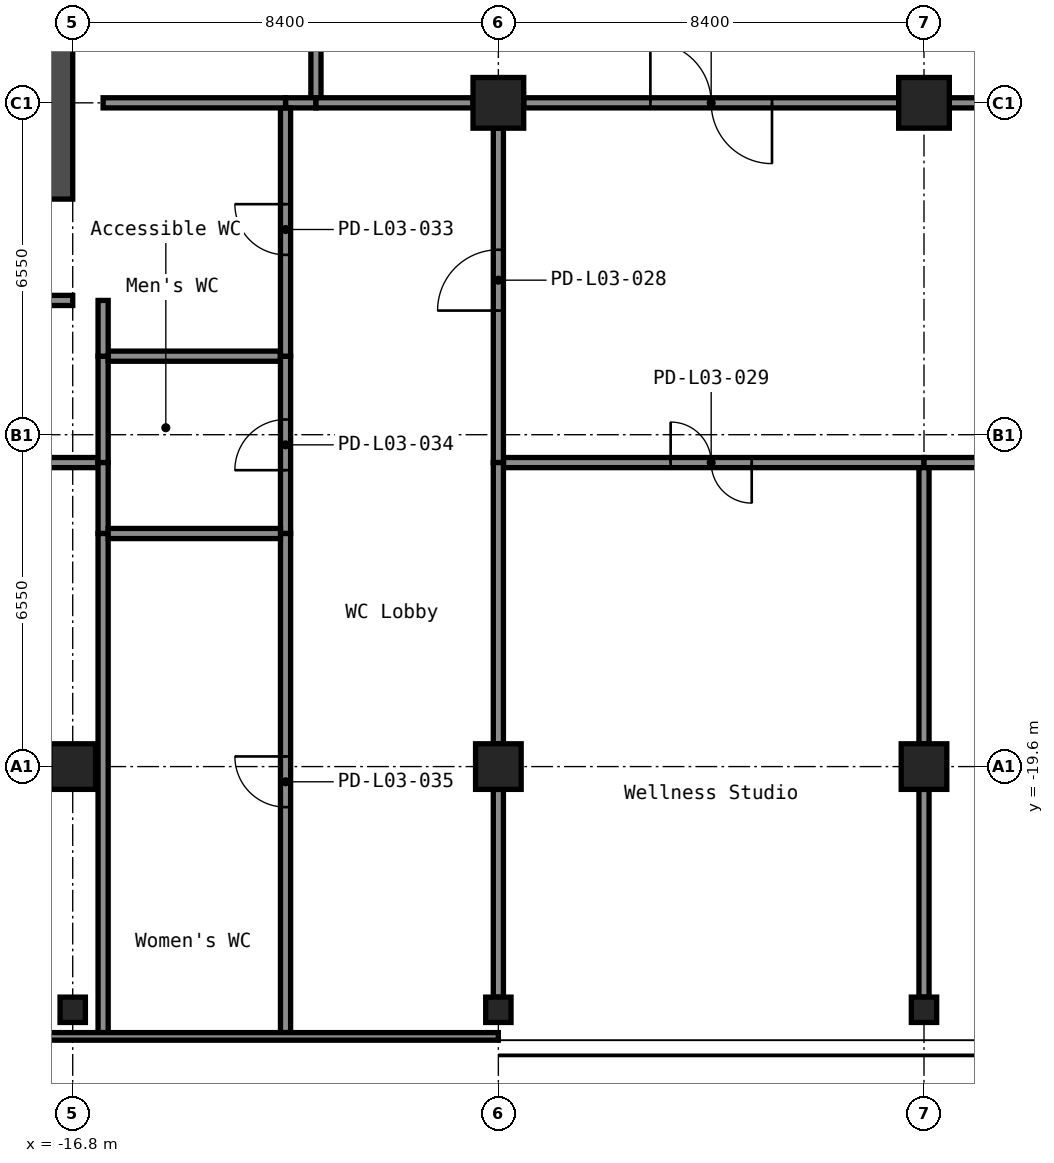
"""IFC4 building model, lengths in metres.
Left out: names, types, materials, properties, quantities, classifications, styles, units other than length and angle.
Written with IfcOpenShell. Run it as: python <this file> out.ifc"""

import sys

from ifc_helpers import new_model, si_unit, direction, frame, frame_2d, origin, origin_2d, place, context, subcontext, project, spatial, rectangle, hollow_rectangle, extrude, element, fill, save


model = new_model("IFC4")
c1 = context("Model", 3, precision=1e-05, world=origin(), true_north=direction((0.0, 1.0)))
c2 = subcontext(c1, "Body", "Model", "MODEL_VIEW")
j1 = project(units=[si_unit("LENGTHUNIT", "METRE"), si_unit("PLANEANGLEUNIT", "RADIAN")], contexts=[c1])
p1 = place(None, origin())
s1 = spatial("IfcSite", under=j1, at=p1, CompositionType="ELEMENT")
p2 = place(p1, origin())
s2 = spatial("IfcBuilding", under=s1, at=p2, CompositionType="ELEMENT")
p3 = place(p2, frame((0.0, 0.0, 15.0)))
s3 = spatial("IfcBuildingStorey", under=s2, at=p3, CompositionType="ELEMENT", Elevation=15.0)
for number, where, z_axis, x_axis in (
    (1, (-16.8, -19.6, 0.0), (0.0, 0.0, 1.0), (1.0, 0.0, 0.0)),
    (2, (-8.4, -19.6, 0.0), (0.0, 0.0, 1.0), (1.0, 0.0, 0.0)),
):
    element("IfcColumn", number, at=place(p3, frame(where, z_axis=z_axis, x_axis=x_axis)), inside=s3, PredefinedType="COLUMN", context=c2, shape_type="SweptSolid", body=[
        extrude(hollow_rectangle(XDim=0.9, YDim=0.9, WallThickness=0.036, at=origin_2d()), origin(), (0.0, 0.0, 1.0), 4.4),
    ])
p4 = place(p3, frame((-8.4, -6.5, 0.0), z_axis=(0.0, 0.0, 1.0), x_axis=(1.0, 0.0, 0.0)))
e3 = element("IfcColumn", 3, at=p4, inside=s3, PredefinedType="COLUMN", context=c2, shape_type="SweptSolid", body=[
    extrude(hollow_rectangle(XDim=1.0, YDim=1.0, WallThickness=0.04, at=origin_2d()), origin(), (0.0, 0.0, 1.0), 4.4),
])
p5 = place(p3, frame((0.0, -19.6, 0.0), z_axis=(0.0, 0.0, 1.0), x_axis=(1.0, 0.0, 0.0)))
e4 = element("IfcColumn", 4, at=p5, inside=s3, PredefinedType="COLUMN", context=c2, shape_type="SweptSolid", body=[
    extrude(hollow_rectangle(XDim=0.9, YDim=0.9, WallThickness=0.036, at=origin_2d()), origin(), (0.0, 0.0, 1.0), 4.4),
])
p6 = place(p3, frame((0.0, -6.5, 0.0), z_axis=(0.0, 0.0, 1.0), x_axis=(1.0, 0.0, 0.0)))
e5 = element("IfcColumn", 5, at=p6, inside=s3, PredefinedType="COLUMN", context=c2, shape_type="SweptSolid", body=[
    extrude(hollow_rectangle(XDim=1.0, YDim=1.0, WallThickness=0.04, at=origin_2d()), origin(), (0.0, 0.0, 1.0), 4.4),
])
for number, where, z_axis, x_axis in (
    (6, (-16.8, -24.4, 0.0), (0.0, 0.0, 1.0), (1.0, 0.0, 0.0)),
    (7, (-8.4, -24.4, 0.0), (0.0, 0.0, 1.0), (1.0, 0.0, 0.0)),
    (8, (0.0, -24.4, 0.0), (0.0, 0.0, 1.0), (1.0, 0.0, 0.0)),
):
    element("IfcColumn", number, at=place(p3, frame(where, z_axis=z_axis, x_axis=x_axis)), inside=s3, PredefinedType="COLUMN", context=c2, shape_type="SweptSolid", body=[
        extrude(hollow_rectangle(XDim=0.5, YDim=0.5, WallThickness=0.019, InnerFilletRadius=0.029, OuterFilletRadius=0.048, at=origin_2d()), origin(), (0.0, 0.0, 1.0), 4.4),
    ])
p7 = place(p3, frame((-17.25, -8.4, 0.0), z_axis=(0.0, 0.0, 1.0), x_axis=(0.0, 1.0, 0.0)))
e9 = element("IfcWall", 9, at=p7, inside=s3, PredefinedType="SHEAR", context=c2, shape_type="SweptSolid", body=[
    extrude(rectangle(XDim=16.8, YDim=0.9, at=frame_2d((8.4, 0.0))), origin(), (0.0, 0.0, 1.0), 4.4),
])
p8 = place(p7, frame((3.4, 0.0, 0.0)))
e10 = element("IfcOpeningElement", 10, at=p8, cuts=e9, PredefinedType="OPENING", context=c2, shape_type="SweptSolid", body=[
    extrude(rectangle(XDim=1.6, YDim=2.1, at=frame_2d((0.8, 1.05))), frame((0.0, 0.46, 0.0), z_axis=(0.0, -1.0, 0.0), x_axis=(1.0, 0.0, 0.0)), (0.0, 0.0, 1.0), 0.92),
])
p9 = place(p7, frame((9.6, 0.0, 0.0)))
e11 = element("IfcOpeningElement", 11, at=p9, cuts=e9, PredefinedType="OPENING", context=c2, shape_type="SweptSolid", body=[
    extrude(rectangle(XDim=1.6, YDim=2.1, at=frame_2d((0.8, 1.05))), frame((0.0, 0.46, 0.0), z_axis=(0.0, -1.0, 0.0), x_axis=(1.0, 0.0, 0.0)), (0.0, 0.0, 1.0), 0.92),
])
p10 = place(p7, frame((11.8, 0.0, 0.0)))
e12 = element("IfcOpeningElement", 12, at=p10, cuts=e9, PredefinedType="OPENING", context=c2, shape_type="SweptSolid", body=[
    extrude(rectangle(XDim=1.6, YDim=2.1, at=frame_2d((0.8, 1.05))), frame((0.0, 0.46, 0.0), z_axis=(0.0, -1.0, 0.0), x_axis=(1.0, 0.0, 0.0)), (0.0, 0.0, 1.0), 0.92),
])
p11 = place(p3, frame((-12.0, 6.4, 0.0), z_axis=(0.0, 0.0, 1.0), x_axis=(0.0, -1.0, 0.0)))
e13 = element("IfcWall", 13, at=p11, inside=s3, PredefinedType="PARTITIONING", context=c2, shape_type="SweptSolid", body=[
    extrude(rectangle(XDim=12.8, YDim=0.2, at=frame_2d((6.4, 0.0))), origin(), (0.0, 0.0, 1.0), 4.4),
])
p12 = place(p11, frame((5.2, 0.0, 0.0)))
e14 = element("IfcOpeningElement", 14, at=p12, cuts=e13, PredefinedType="OPENING", context=c2, shape_type="SweptSolid", body=[
    extrude(rectangle(XDim=2.4, YDim=2.1, at=frame_2d((1.2, 1.05))), frame((0.0, 0.11, 0.0), z_axis=(0.0, -1.0, 0.0), x_axis=(1.0, 0.0, 0.0)), (0.0, 0.0, 1.0), 0.22),
])
p13 = place(p3, frame((7.9, -6.5, 0.0), z_axis=(0.0, 0.0, 1.0), x_axis=(-1.0, 0.0, 0.0)))
e15 = element("IfcWall", 15, at=p13, inside=s3, PredefinedType="PARTITIONING", context=c2, shape_type="SweptSolid", body=[
    extrude(rectangle(XDim=7.4, YDim=0.2, at=frame_2d((3.7, 0.0))), origin(), (0.0, 0.0, 1.0), 4.4),
])
p14 = place(p13, frame((2.5, 0.0, 0.0)))
e16 = element("IfcOpeningElement", 16, at=p14, cuts=e15, PredefinedType="OPENING", context=c2, shape_type="SweptSolid", body=[
    extrude(rectangle(XDim=2.4, YDim=2.1, at=frame_2d((1.2, 1.05))), frame((0.0, 0.11, 0.0), z_axis=(0.0, -1.0, 0.0), x_axis=(1.0, 0.0, 0.0)), (0.0, 0.0, 1.0), 0.22),
])
p15 = place(p3, frame((-0.5, -6.5, 0.0), z_axis=(0.0, 0.0, 1.0), x_axis=(-1.0, 0.0, 0.0)))
e17 = element("IfcWall", 17, at=p15, inside=s3, PredefinedType="PARTITIONING", context=c2, shape_type="SweptSolid", body=[
    extrude(rectangle(XDim=7.4, YDim=0.2, at=frame_2d((3.7, 0.0))), origin(), (0.0, 0.0, 1.0), 4.4),
])
p16 = place(p15, frame((2.5, 0.0, 0.0)))
e18 = element("IfcOpeningElement", 18, at=p16, cuts=e17, PredefinedType="OPENING", context=c2, shape_type="SweptSolid", body=[
    extrude(rectangle(XDim=2.4, YDim=2.1, at=frame_2d((1.2, 1.05))), frame((0.0, 0.11, 0.0), z_axis=(0.0, -1.0, 0.0), x_axis=(1.0, 0.0, 0.0)), (0.0, 0.0, 1.0), 0.22),
])
p17 = place(p3, frame((-16.3, -13.6, 0.0), z_axis=(0.0, 0.0, 1.0), x_axis=(-1.0, 0.0, 0.0)))
e19 = element("IfcWall", 19, at=p17, inside=s3, PredefinedType="PARTITIONING", context=c2, shape_type="SweptSolid", body=[
    extrude(rectangle(XDim=8.9, YDim=0.2, at=frame_2d((4.45, 0.0))), origin(), (0.0, 0.0, 1.0), 4.4),
])
p18 = place(p17, frame((3.95, 0.0, 0.0)))
e20 = element("IfcOpeningElement", 20, at=p18, cuts=e19, PredefinedType="OPENING", context=c2, shape_type="SweptSolid", body=[
    extrude(rectangle(XDim=1.0, YDim=2.1, at=frame_2d((0.5, 1.05))), frame((0.0, 0.11, 0.0), z_axis=(0.0, -1.0, 0.0), x_axis=(1.0, 0.0, 0.0)), (0.0, 0.0, 1.0), 0.22),
])
p19 = place(p3, frame((0.0, -13.6, 0.0), z_axis=(0.0, 0.0, 1.0), x_axis=(-1.0, 0.0, 0.0)))
e21 = element("IfcWall", 21, at=p19, inside=s3, PredefinedType="PARTITIONING", context=c2, shape_type="SweptSolid", body=[
    extrude(rectangle(XDim=8.3, YDim=0.2, at=frame_2d((4.15, 0.0))), origin(), (0.0, 0.0, 1.0), 4.4),
])
p20 = place(p19, frame((3.4, 0.0, 0.0)))
e22 = element("IfcOpeningElement", 22, at=p20, cuts=e21, PredefinedType="OPENING", context=c2, shape_type="SweptSolid", body=[
    extrude(rectangle(XDim=1.6, YDim=2.1, at=frame_2d((0.8, 1.05))), frame((0.0, 0.11, 0.0), z_axis=(0.0, -1.0, 0.0), x_axis=(1.0, 0.0, 0.0)), (0.0, 0.0, 1.0), 0.22),
])
p21 = place(p3, frame((8.4, -13.6, 0.0), z_axis=(0.0, 0.0, 1.0), x_axis=(-1.0, 0.0, 0.0)))
e23 = element("IfcWall", 23, at=p21, inside=s3, PredefinedType="PARTITIONING", context=c2, shape_type="SweptSolid", body=[
    extrude(rectangle(XDim=8.4, YDim=0.2, at=frame_2d((4.2, 0.0))), origin(), (0.0, 0.0, 1.0), 4.4),
])
p22 = place(p21, frame((3.4, 0.0, 0.0)))
e24 = element("IfcOpeningElement", 24, at=p22, cuts=e23, PredefinedType="OPENING", context=c2, shape_type="SweptSolid", body=[
    extrude(rectangle(XDim=1.6, YDim=2.1, at=frame_2d((0.8, 1.05))), frame((0.0, 0.11, 0.0), z_axis=(0.0, -1.0, 0.0), x_axis=(1.0, 0.0, 0.0)), (0.0, 0.0, 1.0), 0.22),
])
p23 = place(p3, frame((-16.2, -13.6, 0.0), z_axis=(0.0, 0.0, 1.0), x_axis=(0.0, 1.0, 0.0)))
e25 = element("IfcWall", 25, at=p23, inside=s3, PredefinedType="PARTITIONING", context=c2, shape_type="SweptSolid", body=[
    extrude(rectangle(XDim=2.1, YDim=0.2, at=frame_2d((1.05, 0.0))), origin(), (0.0, 0.0, 1.0), 4.4),
])
p24 = place(p3, frame((-16.2, -15.0, 0.0), z_axis=(0.0, 0.0, 1.0), x_axis=(0.0, 1.0, 0.0)))
e26 = element("IfcWall", 26, at=p24, inside=s3, PredefinedType="PARTITIONING", context=c2, shape_type="SweptSolid", body=[
    extrude(rectangle(XDim=1.4, YDim=0.2, at=frame_2d((0.7, 0.0))), origin(), (0.0, 0.0, 1.0), 4.4),
])
p25 = place(p3, frame((-16.1, -11.5, 0.0), z_axis=(0.0, 0.0, 1.0), x_axis=(1.0, 0.0, 0.0)))
e27 = element("IfcWall", 27, at=p25, inside=s3, PredefinedType="PARTITIONING", context=c2, shape_type="SweptSolid", body=[
    extrude(rectangle(XDim=3.4, YDim=0.2, at=frame_2d((1.7, 0.0))), origin(), (0.0, 0.0, 1.0), 4.4),
])
p26 = place(p3, frame((-12.6, -6.5, 0.0), z_axis=(0.0, 0.0, 1.0), x_axis=(1.0, 0.0, 0.0)))
e28 = element("IfcWall", 28, at=p26, inside=s3, PredefinedType="PARTITIONING", context=c2, shape_type="SweptSolid", body=[
    extrude(rectangle(XDim=0.6, YDim=0.2, at=frame_2d((0.3, 0.0))), origin(), (0.0, 0.0, 1.0), 4.4),
])
p27 = place(p3, frame((-12.0, -6.5, 0.0), z_axis=(0.0, 0.0, 1.0), x_axis=(1.0, 0.0, 0.0)))
e29 = element("IfcWall", 29, at=p27, inside=s3, PredefinedType="PARTITIONING", context=c2, shape_type="SweptSolid", body=[
    extrude(rectangle(XDim=3.1, YDim=0.2, at=frame_2d((1.55, 0.0))), origin(), (0.0, 0.0, 1.0), 4.4),
])
p28 = place(p3, frame((-8.4, -7.0, 0.0), z_axis=(0.0, 0.0, 1.0), x_axis=(0.0, -1.0, 0.0)))
e30 = element("IfcWall", 30, at=p28, inside=s3, PredefinedType="PARTITIONING", context=c2, shape_type="SweptSolid", body=[
    extrude(rectangle(XDim=6.6, YDim=0.2, at=frame_2d((3.3, 0.0))), origin(), (0.0, 0.0, 1.0), 4.4),
])
p29 = place(p28, frame((2.4, 0.0, 0.0)))
e31 = element("IfcOpeningElement", 31, at=p29, cuts=e30, PredefinedType="OPENING", context=c2, shape_type="SweptSolid", body=[
    extrude(rectangle(XDim=1.2, YDim=2.1, at=frame_2d((0.6, 1.05))), frame((0.0, 0.11, 0.0), z_axis=(0.0, -1.0, 0.0), x_axis=(1.0, 0.0, 0.0)), (0.0, 0.0, 1.0), 0.22),
])
p30 = place(p3, frame((-12.6, -15.0, 0.0), z_axis=(0.0, 0.0, 1.0), x_axis=(0.0, 1.0, 0.0)))
e32 = element("IfcWall", 32, at=p30, inside=s3, PredefinedType="PARTITIONING", context=c2, shape_type="SweptSolid", body=[
    extrude(rectangle(XDim=3.5, YDim=0.2, at=frame_2d((1.75, 0.0))), origin(), (0.0, 0.0, 1.0), 4.4),
])
p31 = place(p30, frame((1.25, 0.0, 0.0)))
e33 = element("IfcOpeningElement", 33, at=p31, cuts=e32, PredefinedType="OPENING", context=c2, shape_type="SweptSolid", body=[
    extrude(rectangle(XDim=1.0, YDim=2.1, at=frame_2d((0.5, 1.05))), frame((0.0, 0.11, 0.0), z_axis=(0.0, -1.0, 0.0), x_axis=(1.0, 0.0, 0.0)), (0.0, 0.0, 1.0), 0.22),
])
p32 = place(p3, frame((-12.6, -11.5, 0.0), z_axis=(0.0, 0.0, 1.0), x_axis=(0.0, 1.0, 0.0)))
e34 = element("IfcWall", 34, at=p32, inside=s3, PredefinedType="PARTITIONING", context=c2, shape_type="SweptSolid", body=[
    extrude(rectangle(XDim=4.9, YDim=0.2, at=frame_2d((2.45, 0.0))), origin(), (0.0, 0.0, 1.0), 4.4),
])
p33 = place(p32, frame((2.0, 0.0, 0.0)))
e35 = element("IfcOpeningElement", 35, at=p33, cuts=e34, PredefinedType="OPENING", context=c2, shape_type="SweptSolid", body=[
    extrude(rectangle(XDim=1.0, YDim=2.1, at=frame_2d((0.5, 1.05))), frame((0.0, 0.11, 0.0), z_axis=(0.0, -1.0, 0.0), x_axis=(1.0, 0.0, 0.0)), (0.0, 0.0, 1.0), 0.22),
])
p34 = place(p3, frame((-12.6, -24.85, 0.0), z_axis=(0.0, 0.0, 1.0), x_axis=(0.0, 1.0, 0.0)))
e36 = element("IfcWall", 36, at=p34, inside=s3, PredefinedType="PARTITIONING", context=c2, shape_type="SweptSolid", body=[
    extrude(rectangle(XDim=9.85, YDim=0.2, at=frame_2d((4.925, 0.0))), origin(), (0.0, 0.0, 1.0), 4.4),
])
p35 = place(p34, frame((4.45, 0.0, 0.0)))
e37 = element("IfcOpeningElement", 37, at=p35, cuts=e36, PredefinedType="OPENING", context=c2, shape_type="SweptSolid", body=[
    extrude(rectangle(XDim=1.0, YDim=2.1, at=frame_2d((0.5, 1.05))), frame((0.0, 0.11, 0.0), z_axis=(0.0, -1.0, 0.0), x_axis=(1.0, 0.0, 0.0)), (0.0, 0.0, 1.0), 0.22),
])
p36 = place(p3, frame((-8.4, -13.6, 0.0), z_axis=(0.0, 0.0, 1.0), x_axis=(0.0, -1.0, 0.0)))
e38 = element("IfcWall", 38, at=p36, inside=s3, PredefinedType="PARTITIONING", context=c2, shape_type="SweptSolid", body=[
    extrude(rectangle(XDim=5.55, YDim=0.2, at=frame_2d((2.775, 0.0))), origin(), (0.0, 0.0, 1.0), 4.4),
])
p37 = place(p3, frame((-8.4, -20.05, 0.0), z_axis=(0.0, 0.0, 1.0), x_axis=(0.0, -1.0, 0.0)))
e39 = element("IfcWall", 39, at=p37, inside=s3, PredefinedType="PARTITIONING", context=c2, shape_type="SweptSolid", body=[
    extrude(rectangle(XDim=4.1, YDim=0.2, at=frame_2d((2.05, 0.0))), origin(), (0.0, 0.0, 1.0), 4.4),
])
p38 = place(p3, frame((-16.2, -6.5, 0.0), z_axis=(0.0, 0.0, 1.0), x_axis=(1.0, 0.0, 0.0)))
e40 = element("IfcWall", 40, at=p38, inside=s3, PredefinedType="PARTITIONING", context=c2, shape_type="SweptSolid", body=[
    extrude(rectangle(XDim=3.6, YDim=0.2, at=frame_2d((1.8, 0.0))), origin(), (0.0, 0.0, 1.0), 4.4),
])
p39 = place(p3, frame((-16.2, -11.5, 0.0), z_axis=(0.0, 0.0, 1.0), x_axis=(0.0, 1.0, 0.0)))
e41 = element("IfcWall", 41, at=p39, inside=s3, PredefinedType="PARTITIONING", context=c2, shape_type="SweptSolid", body=[
    extrude(rectangle(XDim=1.1, YDim=0.2, at=frame_2d((0.55, 0.0))), origin(), (0.0, 0.0, 1.0), 4.4),
])
p40 = place(p3, frame((-16.2, -24.85, 0.0), z_axis=(0.0, 0.0, 1.0), x_axis=(0.0, 1.0, 0.0)))
e42 = element("IfcWall", 42, at=p40, inside=s3, PredefinedType="PARTITIONING", context=c2, shape_type="SweptSolid", body=[
    extrude(rectangle(XDim=9.85, YDim=0.2, at=frame_2d((4.925, 0.0))), origin(), (0.0, 0.0, 1.0), 4.4),
])
p41 = place(p3, frame((-16.1, -15.0, 0.0), z_axis=(0.0, 0.0, 1.0), x_axis=(1.0, 0.0, 0.0)))
e43 = element("IfcWall", 43, at=p41, inside=s3, PredefinedType="PARTITIONING", context=c2, shape_type="SweptSolid", body=[
    extrude(rectangle(XDim=3.4, YDim=0.2, at=frame_2d((1.7, 0.0))), origin(), (0.0, 0.0, 1.0), 4.4),
])
p42 = place(p3, frame((0.0, -13.7, 0.0), z_axis=(0.0, 0.0, 1.0), x_axis=(0.0, -1.0, 0.0)))
e44 = element("IfcWall", 44, at=p42, inside=s3, PredefinedType="PARTITIONING", context=c2, shape_type="SweptSolid", body=[
    extrude(rectangle(XDim=5.45, YDim=0.2, at=frame_2d((2.725, 0.0))), origin(), (0.0, 0.0, 1.0), 4.4),
])
p43 = place(p3, frame((0.0, -20.05, 0.0), z_axis=(0.0, 0.0, 1.0), x_axis=(0.0, -1.0, 0.0)))
e45 = element("IfcWall", 45, at=p43, inside=s3, PredefinedType="PARTITIONING", context=c2, shape_type="SweptSolid", body=[
    extrude(rectangle(XDim=4.1, YDim=0.2, at=frame_2d((2.05, 0.0))), origin(), (0.0, 0.0, 1.0), 4.4),
])
p44 = place(p3, frame((-16.8, -10.4, 0.0), z_axis=(0.0, 0.0, 1.0), x_axis=(-1.0, 0.0, 0.0)))
e46 = element("IfcWall", 46, at=p44, inside=s3, PredefinedType="PARTITIONING", context=c2, shape_type="SweptSolid", body=[
    extrude(rectangle(XDim=22.2, YDim=0.2, at=frame_2d((11.1, 0.0))), origin(), (0.0, 0.0, 1.0), 4.4),
])
p45 = place(p44, frame((17.5, 0.0, 0.0)))
e47 = element("IfcOpeningElement", 47, at=p45, cuts=e46, PredefinedType="OPENING", context=c2, shape_type="SweptSolid", body=[
    extrude(rectangle(XDim=1.4, YDim=2.1, at=frame_2d((0.7, 1.05))), frame((0.0, 0.11, 0.0), z_axis=(0.0, -1.0, 0.0), x_axis=(1.0, 0.0, 0.0)), (0.0, 0.0, 1.0), 0.22),
])
p46 = place(p3, frame((-8.4, -24.925, 0.0), z_axis=(0.0, 0.0, 1.0), x_axis=(-1.0, 0.0, 0.0)))
e48 = element("IfcWall", 48, at=p46, inside=s3, PredefinedType="STANDARD", context=c2, shape_type="SweptSolid", body=[
    extrude(rectangle(XDim=43.58, YDim=0.15, at=frame_2d((21.79, 0.0))), origin(), (0.0, 0.0, 1.0), 4.4),
])
p47 = place(p16, origin())
e49 = element("IfcDoor", 49, at=p47, inside=s3, OperationType="DOUBLE_DOOR_DOUBLE_SWING", PredefinedType="DOOR", context=c2, shape_type="SweptSolid", body=[
    extrude(rectangle(XDim=2.4, YDim=2.1, at=frame_2d((1.2, 1.05))), frame((0.0, 0.025, 0.0), z_axis=(0.0, -1.0, 0.0), x_axis=(1.0, 0.0, 0.0)), (0.0, 0.0, 1.0), 0.05),
])
fill(e18, e49)
p48 = place(p29, origin())
e50 = element("IfcDoor", 50, at=p48, inside=s3, OperationType="SINGLE_SWING_RIGHT", PredefinedType="DOOR", context=c2, shape_type="SweptSolid", body=[
    extrude(rectangle(XDim=1.2, YDim=2.1, at=frame_2d((0.6, 1.05))), frame((0.0, 0.025, 0.0), z_axis=(0.0, -1.0, 0.0), x_axis=(1.0, 0.0, 0.0)), (0.0, 0.0, 1.0), 0.05),
])
fill(e31, e50)
p49 = place(p20, origin())
e51 = element("IfcDoor", 51, at=p49, inside=s3, OperationType="DOUBLE_DOOR_DOUBLE_SWING", PredefinedType="DOOR", context=c2, shape_type="SweptSolid", body=[
    extrude(rectangle(XDim=1.6, YDim=2.1, at=frame_2d((0.8, 1.05))), frame((0.0, 0.025, 0.0), z_axis=(0.0, -1.0, 0.0), x_axis=(1.0, 0.0, 0.0)), (0.0, 0.0, 1.0), 0.05),
])
fill(e22, e51)
p50 = place(p33, origin())
e52 = element("IfcDoor", 52, at=p50, inside=s3, OperationType="SINGLE_SWING_LEFT", PredefinedType="DOOR", context=c2, shape_type="SweptSolid", body=[
    extrude(rectangle(XDim=1.0, YDim=2.1, at=frame_2d((0.5, 1.05))), frame((0.0, 0.025, 0.0), z_axis=(0.0, -1.0, 0.0), x_axis=(1.0, 0.0, 0.0)), (0.0, 0.0, 1.0), 0.05),
])
fill(e35, e52)
p51 = place(p31, origin())
e53 = element("IfcDoor", 53, at=p51, inside=s3, OperationType="SINGLE_SWING_RIGHT", PredefinedType="DOOR", context=c2, shape_type="SweptSolid", body=[
    extrude(rectangle(XDim=1.0, YDim=2.1, at=frame_2d((0.5, 1.05))), frame((0.0, 0.025, 0.0), z_axis=(0.0, -1.0, 0.0), x_axis=(1.0, 0.0, 0.0)), (0.0, 0.0, 1.0), 0.05),
])
fill(e33, e53)
p52 = place(p35, origin())
e54 = element("IfcDoor", 54, at=p52, inside=s3, OperationType="SINGLE_SWING_LEFT", PredefinedType="DOOR", context=c2, shape_type="SweptSolid", body=[
    extrude(rectangle(XDim=1.0, YDim=2.1, at=frame_2d((0.5, 1.05))), frame((0.0, 0.025, 0.0), z_axis=(0.0, -1.0, 0.0), x_axis=(1.0, 0.0, 0.0)), (0.0, 0.0, 1.0), 0.05),
])
fill(e37, e54)
save(model, sys.argv[1])
